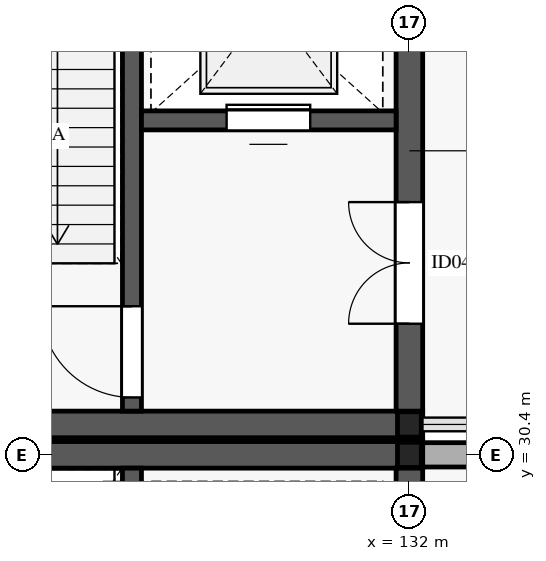
"""IFC4 building model, lengths in metres.
Left out: names, types, materials, properties, quantities, classifications, styles, units other than length and angle.
Written with IfcOpenShell. Run it as: python <this file> out.ifc"""

import sys

from ifc_helpers import new_model, si_unit, direction, frame, frame_2d, origin, origin_2d, place, context, subcontext, project, spatial, rectangle, i_section, extrude, element, fill, save


model = new_model("IFC4")
c1 = context("Model", 3, precision=1e-05, world=origin(), true_north=direction((0.0, 1.0)))
c2 = subcontext(c1, "Body", "Model", "MODEL_VIEW")
j1 = project(units=[si_unit("LENGTHUNIT", "METRE"), si_unit("PLANEANGLEUNIT", "RADIAN")], contexts=[c1])
p1 = place(None, origin())
s1 = spatial("IfcSite", under=j1, at=p1, CompositionType="ELEMENT")
p2 = place(p1, origin())
s2 = spatial("IfcBuilding", under=s1, at=p2, CompositionType="ELEMENT")
p3 = place(p2, frame((0.0, 0.0, 5.4)))
s3 = spatial("IfcBuildingStorey", under=s2, at=p3, CompositionType="ELEMENT", Elevation=5.4)
for number, where, z_axis, x_axis in (
    (1, (132.0, 30.4, 0.0), (0.0, 0.0, 1.0), (1.0, 0.0, 0.0)),
    (2, (132.0, 30.8, 0.0), (0.0, 0.0, 1.0), (1.0, 0.0, 0.0)),
):
    element("IfcColumn", number, at=place(p3, frame(where, z_axis=z_axis, x_axis=x_axis)), inside=s3, PredefinedType="COLUMN", context=c2, shape_type="SweptSolid", body=[
        extrude(i_section(OverallWidth=0.313, OverallDepth=0.333, WebThickness=0.018, FlangeThickness=0.028, FilletRadius=0.015, at=origin_2d()), origin(), (0.0, 0.0, 1.0), 5.185),
    ])
p4 = place(p3, frame((131.98, 30.4, 0.0), z_axis=(0.0, 0.0, 1.0), x_axis=(1.0, 0.0, 0.0)))
e3 = element("IfcWall", 3, at=p4, inside=s3, PredefinedType="STANDARD", context=c2, shape_type="SweptSolid", body=[
    extrude(rectangle(XDim=8.04, YDim=0.32, at=frame_2d((4.02, 0.0))), origin(), (0.0, 0.0, 1.0), 4.25),
])
p5 = place(p4, frame((2.22, 0.0, 0.75)))
e4 = element("IfcOpeningElement", 4, at=p5, cuts=e3, PredefinedType="OPENING", context=c2, shape_type="SweptSolid", body=[
    extrude(rectangle(XDim=3.6, YDim=2.15, at=frame_2d((1.8, 1.075))), frame((0.0, 0.17, 0.0), z_axis=(0.0, -1.0, 0.0), x_axis=(1.0, 0.0, 0.0)), (0.0, 0.0, 1.0), 0.34),
])
p6 = place(p3, frame((124.225, 30.4, 0.0), z_axis=(0.0, 0.0, 1.0), x_axis=(1.0, 0.0, 0.0)))
e5 = element("IfcWall", 5, at=p6, inside=s3, PredefinedType="SHEAR", context=c2, shape_type="SweptSolid", body=[
    extrude(rectangle(XDim=7.95, YDim=0.35, at=frame_2d((3.975, 0.0))), origin(), (0.0, 0.0, 1.0), 5.19),
])
p7 = place(p3, frame((132.0, 22.975, 0.0), z_axis=(0.0, 0.0, 1.0), x_axis=(0.0, 1.0, 0.0)))
e6 = element("IfcWall", 6, at=p7, inside=s3, PredefinedType="SHEAR", context=c2, shape_type="SweptSolid", body=[
    extrude(rectangle(XDim=7.25, YDim=0.35, at=frame_2d((3.625, 0.0))), origin(), (0.0, 0.0, 1.0), 5.19),
])
p8 = place(p3, frame((128.35, 22.975, 0.0), z_axis=(0.0, 0.0, 1.0), x_axis=(0.0, 1.0, 0.0)))
e7 = element("IfcWall", 7, at=p8, inside=s3, PredefinedType="SHEAR", context=c2, shape_type="SweptSolid", body=[
    extrude(rectangle(XDim=7.25, YDim=0.25, at=frame_2d((3.625, 0.0))), origin(), (0.0, 0.0, 1.0), 5.19),
])
p9 = place(p8, frame((0.18, 0.0, 0.0)))
e8 = element("IfcOpeningElement", 8, at=p9, cuts=e7, PredefinedType="OPENING", context=c2, shape_type="SweptSolid", body=[
    extrude(rectangle(XDim=1.2, YDim=2.2, at=frame_2d((0.6, 1.1))), frame((0.0, 0.135, 0.0), z_axis=(0.0, -1.0, 0.0), x_axis=(1.0, 0.0, 0.0)), (0.0, 0.0, 1.0), 0.27),
])
p10 = place(p3, frame((124.225, 30.8, 0.0), z_axis=(0.0, 0.0, 1.0), x_axis=(1.0, 0.0, 0.0)))
e9 = element("IfcWall", 9, at=p10, inside=s3, PredefinedType="SHEAR", context=c2, shape_type="SweptSolid", body=[
    extrude(rectangle(XDim=7.95, YDim=0.35, at=frame_2d((3.975, 0.0))), origin(), (0.0, 0.0, 1.0), 5.19),
])
p11 = place(p3, frame((132.0, 30.975, 0.0), z_axis=(0.0, 0.0, 1.0), x_axis=(0.0, 1.0, 0.0)))
e10 = element("IfcWall", 10, at=p11, inside=s3, PredefinedType="SHEAR", context=c2, shape_type="SweptSolid", body=[
    extrude(rectangle(XDim=6.85, YDim=0.35, at=frame_2d((3.425, 0.0))), origin(), (0.0, 0.0, 1.0), 5.19),
])
p12 = place(p11, frame((1.15, 0.0, 0.0)))
e11 = element("IfcOpeningElement", 11, at=p12, cuts=e10, PredefinedType="OPENING", context=c2, shape_type="SweptSolid", body=[
    extrude(rectangle(XDim=1.6, YDim=2.35, at=frame_2d((0.8, 1.175))), frame((0.0, 0.185, 0.0), z_axis=(0.0, -1.0, 0.0), x_axis=(1.0, 0.0, 0.0)), (0.0, 0.0, 1.0), 0.37),
])
p13 = place(p3, frame((128.35, 30.975, 0.0), z_axis=(0.0, 0.0, 1.0), x_axis=(0.0, 1.0, 0.0)))
e12 = element("IfcWall", 12, at=p13, inside=s3, PredefinedType="SHEAR", context=c2, shape_type="SweptSolid", body=[
    extrude(rectangle(XDim=6.85, YDim=0.25, at=frame_2d((3.425, 0.0))), origin(), (0.0, 0.0, 1.0), 5.19),
])
p14 = place(p13, frame((0.18, 0.0, 0.0)))
e13 = element("IfcOpeningElement", 13, at=p14, cuts=e12, PredefinedType="OPENING", context=c2, shape_type="SweptSolid", body=[
    extrude(rectangle(XDim=1.2, YDim=2.2, at=frame_2d((0.6, 1.1))), frame((0.0, 0.135, 0.0), z_axis=(0.0, -1.0, 0.0), x_axis=(1.0, 0.0, 0.0)), (0.0, 0.0, 1.0), 0.27),
])
p15 = place(p3, frame((128.475, 34.8, 0.0), z_axis=(0.0, 0.0, 1.0), x_axis=(1.0, 0.0, 0.0)))
e14 = element("IfcWall", 14, at=p15, inside=s3, PredefinedType="SHEAR", context=c2, shape_type="SweptSolid", body=[
    extrude(rectangle(XDim=3.35, YDim=0.25, at=frame_2d((1.675, 0.0))), origin(), (0.0, 0.0, 1.0), 5.19),
])
p16 = place(p15, frame((1.12, 0.0, 0.0)))
e15 = element("IfcOpeningElement", 15, at=p16, cuts=e14, PredefinedType="OPENING", context=c2, shape_type="SweptSolid", body=[
    extrude(rectangle(XDim=1.1, YDim=2.2, at=frame_2d((0.55, 1.1))), frame((0.0, 0.135, 0.0), z_axis=(0.0, -1.0, 0.0), x_axis=(1.0, 0.0, 0.0)), (0.0, 0.0, 1.0), 0.27),
])
p17 = place(p14, origin())
e16 = element("IfcDoor", 16, at=p17, inside=s3, OperationType="SINGLE_SWING_RIGHT", PredefinedType="DOOR", context=c2, shape_type="SweptSolid", body=[
    extrude(rectangle(XDim=1.2, YDim=2.2, at=frame_2d((0.6, 1.1))), frame((0.0, 0.025, 0.0), z_axis=(0.0, -1.0, 0.0), x_axis=(1.0, 0.0, 0.0)), (0.0, 0.0, 1.0), 0.05),
])
fill(e13, e16)
p18 = place(p12, origin())
e17 = element("IfcDoor", 17, at=p18, inside=s3, OperationType="DOUBLE_DOOR_SINGLE_SWING", PredefinedType="DOOR", context=c2, shape_type="SweptSolid", body=[
    extrude(rectangle(XDim=1.6, YDim=2.35, at=frame_2d((0.8, 1.175))), frame((0.0, 0.025, 0.0), z_axis=(0.0, -1.0, 0.0), x_axis=(1.0, 0.0, 0.0)), (0.0, 0.0, 1.0), 0.05),
])
fill(e11, e17)
p19 = place(p16, origin())
e18 = element("IfcDoor", 18, at=p19, inside=s3, OperationType="SLIDING_TO_LEFT", PredefinedType="DOOR", context=c2, shape_type="SweptSolid", body=[
    extrude(rectangle(XDim=1.1, YDim=2.2, at=frame_2d((0.55, 1.1))), frame((0.0, 0.025, 0.0), z_axis=(0.0, -1.0, 0.0), x_axis=(1.0, 0.0, 0.0)), (0.0, 0.0, 1.0), 0.05),
])
fill(e15, e18)
save(model, sys.argv[1])
